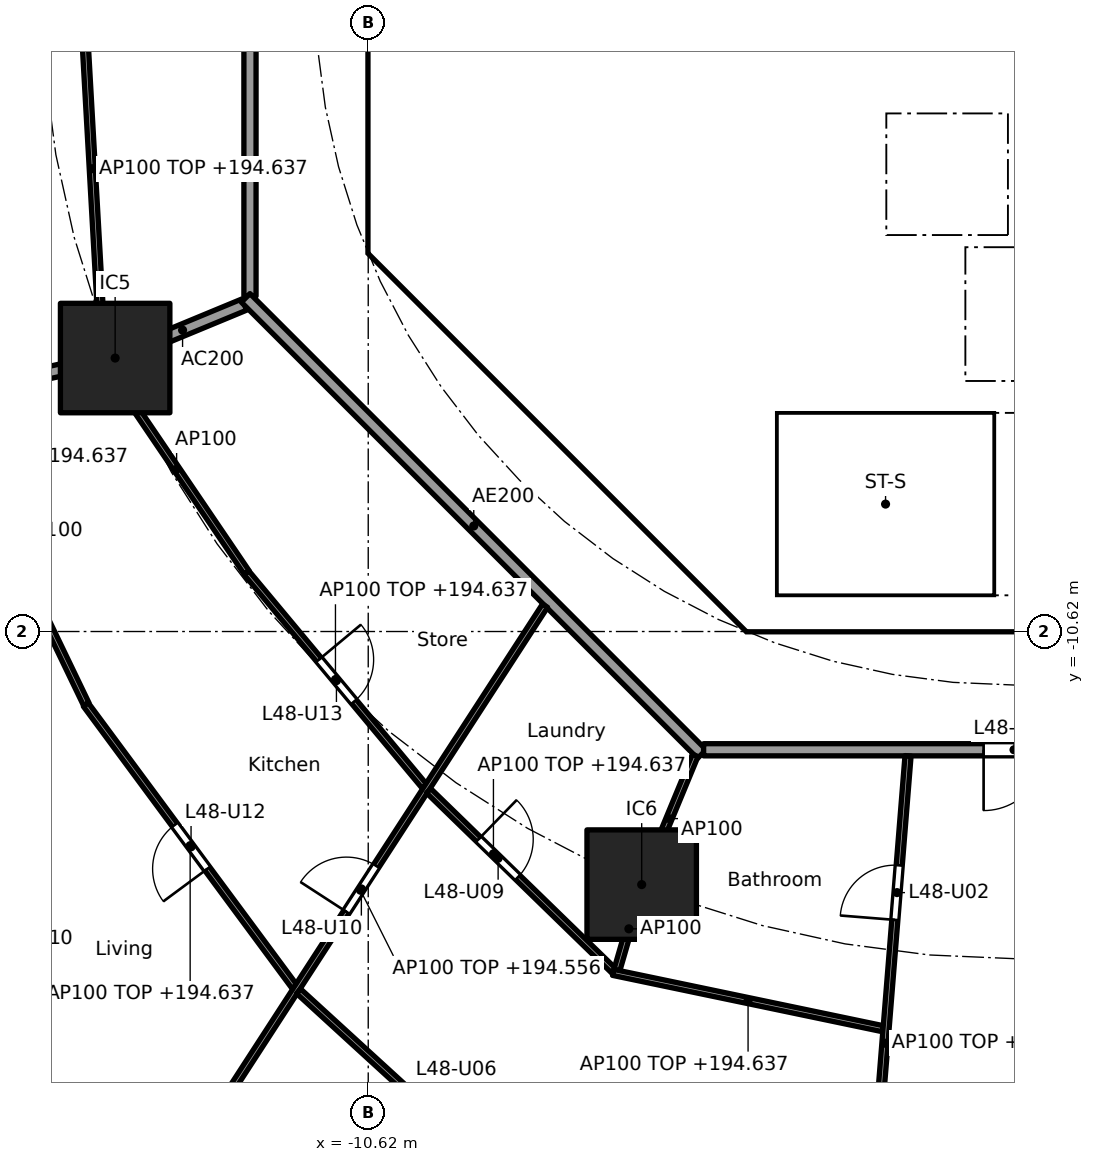
"""IFC4 building model, lengths in metres.
Left out: names, types, materials, properties, quantities, classifications, styles, units other than length and angle.
Written with IfcOpenShell. Run it as: python <this file> out.ifc"""

import sys

from ifc_helpers import new_model, si_unit, direction, frame, frame_2d, origin, origin_2d, place, context, subcontext, project, spatial, polyline, rectangle, outline, extrude, element, fill, save


model = new_model("IFC4")
c1 = context("Model", 3, precision=1e-05, world=origin(), true_north=direction((0.0, 1.0)))
c2 = subcontext(c1, "Body", "Model", "MODEL_VIEW")
j1 = project(units=[si_unit("LENGTHUNIT", "METRE"), si_unit("PLANEANGLEUNIT", "RADIAN")], contexts=[c1])
p1 = place(None, origin())
s1 = spatial("IfcSite", under=j1, at=p1, CompositionType="ELEMENT")
p2 = place(p1, origin())
s2 = spatial("IfcBuilding", under=s1, at=p2, CompositionType="ELEMENT")
p3 = place(p2, frame((0.0, 0.0, 191.8)))
s3 = spatial("IfcBuildingStorey", under=s2, at=p3, CompositionType="ELEMENT", Elevation=191.8)
for number, where, z_axis, x_axis in (
    (1, (-14.782, -6.123, 0.0), (0.0, 0.0, 1.0), (1.0, 0.0, 0.0)),
    (2, (-6.123, -14.782, 0.0), (0.0, 0.0, 1.0), (1.0, 0.0, 0.0)),
):
    element("IfcColumn", number, at=place(p3, frame(where, z_axis=z_axis, x_axis=x_axis)), inside=s3, PredefinedType="COLUMN", context=c2, shape_type="SweptSolid", body=[
        extrude(rectangle(XDim=1.8, YDim=1.8, at=origin_2d()), origin(), (0.0, 0.0, 1.0), 3.7),
    ])
p4 = place(p3, frame((-10.325, 3.801, 0.0), z_axis=(0.0, 0.0, 1.0), x_axis=(0.0, -1.0, 0.0)))
e3 = element("IfcWall", 3, at=p4, inside=s3, PredefinedType="SHEAR", context=c2, shape_type="SweptSolid", body=[
    extrude(rectangle(XDim=7.602, YDim=0.6, at=frame_2d((3.801, 0.0))), origin(), (0.0, 0.0, 1.0), 3.44),
])
p5 = place(p4, frame((0.651, 0.0, 0.0)))
e4 = element("IfcOpeningElement", 4, at=p5, cuts=e3, PredefinedType="OPENING", context=c2, shape_type="SweptSolid", body=[
    extrude(rectangle(XDim=1.5, YDim=2.1, at=frame_2d((0.75, 1.05))), frame((0.0, 0.31, 0.0), z_axis=(0.0, -1.0, 0.0), x_axis=(1.0, 0.0, 0.0)), (0.0, 0.0, 1.0), 0.62),
])
p6 = place(p4, frame((5.451, 0.0, 0.0)))
e5 = element("IfcOpeningElement", 5, at=p6, cuts=e3, PredefinedType="OPENING", context=c2, shape_type="SweptSolid", body=[
    extrude(rectangle(XDim=1.5, YDim=2.1, at=frame_2d((0.75, 1.05))), frame((0.0, 0.31, 0.0), z_axis=(0.0, -1.0, 0.0), x_axis=(1.0, 0.0, 0.0)), (0.0, 0.0, 1.0), 0.62),
])
p7 = place(p3, frame((-9.988, -4.613, 0.0), z_axis=(0.0, 0.0, 1.0), x_axis=(0.707106781187, -0.707106781187, 0.0)))
e6 = element("IfcWall", 6, at=p7, inside=s3, PredefinedType="SHEAR", context=c2, shape_type="SweptSolid", body=[
    extrude(rectangle(XDim=7.602, YDim=0.6, at=frame_2d((3.801, 0.0))), origin(), (0.0, 0.0, 1.0), 3.44),
])
p8 = place(p7, frame((6.151, 0.0, 0.0)))
e7 = element("IfcOpeningElement", 7, at=p8, cuts=e6, PredefinedType="OPENING", context=c2, shape_type="SweptSolid", body=[
    extrude(rectangle(XDim=1.1, YDim=2.1, at=frame_2d((0.55, 1.05))), frame((0.0, 0.31, 0.0), z_axis=(0.0, -1.0, 0.0), x_axis=(1.0, 0.0, 0.0)), (0.0, 0.0, 1.0), 0.62),
])
p9 = place(p3, frame((-7.4, -6.627, 0.0), z_axis=(0.0, 0.0, 1.0), x_axis=(0.0, 1.0, 0.0)))
e8 = element("IfcWall", 8, at=p9, inside=s3, PredefinedType="PARTITIONING", context=c2, shape_type="SweptSolid", body=[
    extrude(rectangle(XDim=2.527, YDim=0.15, at=frame_2d((1.263, 0.0))), origin(), (0.0, 0.0, 1.0), 3.44),
])
p10 = place(p9, frame((0.776, 0.0, 0.0)))
e9 = element("IfcOpeningElement", 9, at=p10, cuts=e8, PredefinedType="OPENING", context=c2, shape_type="SweptSolid", body=[
    extrude(rectangle(XDim=0.9, YDim=2.1, at=frame_2d((0.45, 1.05))), frame((0.0, 0.085, 0.0), z_axis=(0.0, -1.0, 0.0), x_axis=(1.0, 0.0, 0.0)), (0.0, 0.0, 1.0), 0.17),
])
p11 = place(p3, frame((-4.0, -6.5, 0.0), z_axis=(0.0, 0.0, 1.0), x_axis=(0.0, 1.0, 0.0)))
e10 = element("IfcWall", 10, at=p11, inside=s3, PredefinedType="SOLIDWALL", context=c2, shape_type="SweptSolid", body=[
    extrude(rectangle(XDim=2.2, YDim=0.2, at=frame_2d((1.1, 0.0))), origin(), (0.0, 0.0, 1.0), 3.44),
])
p12 = place(p11, frame((0.65, 0.0, 0.0)))
e11 = element("IfcOpeningElement", 11, at=p12, cuts=e10, PredefinedType="OPENING", context=c2, shape_type="SweptSolid", body=[
    extrude(rectangle(XDim=0.9, YDim=2.1, at=frame_2d((0.45, 1.05))), frame((0.0, 0.11, 0.0), z_axis=(0.0, -1.0, 0.0), x_axis=(1.0, 0.0, 0.0)), (0.0, 0.0, 1.0), 0.22),
])
p13 = place(p3, frame((-6.7, -2.0, 0.0), z_axis=(0.0, 0.0, 1.0), x_axis=(1.0, 0.0, 0.0)))
e12 = element("IfcWall", 12, at=p13, inside=s3, PredefinedType="SOLIDWALL", context=c2, shape_type="SweptSolid", body=[
    extrude(rectangle(XDim=13.4, YDim=0.2, at=frame_2d((6.7, 0.0))), origin(), (0.0, 0.0, 1.0), 3.44),
])
p14 = place(p13, frame((5.05, 0.0, 0.0)))
e13 = element("IfcOpeningElement", 13, at=p14, cuts=e12, PredefinedType="OPENING", context=c2, shape_type="SweptSolid", body=[
    extrude(rectangle(XDim=1.1, YDim=2.1, at=frame_2d((0.55, 1.05))), frame((0.0, 0.11, 0.0), z_axis=(0.0, -1.0, 0.0), x_axis=(1.0, 0.0, 0.0)), (0.0, 0.0, 1.0), 0.22),
])
p15 = place(p13, frame((7.25, 0.0, 0.0)))
e14 = element("IfcOpeningElement", 14, at=p15, cuts=e12, PredefinedType="OPENING", context=c2, shape_type="SweptSolid", body=[
    extrude(rectangle(XDim=1.1, YDim=2.1, at=frame_2d((0.55, 1.05))), frame((0.0, 0.11, 0.0), z_axis=(0.0, -1.0, 0.0), x_axis=(1.0, 0.0, 0.0)), (0.0, 0.0, 1.0), 0.22),
])
p16 = place(p13, frame((1.85, 0.0, 0.0)))
e15 = element("IfcOpeningElement", 15, at=p16, cuts=e12, PredefinedType="OPENING", context=c2, shape_type="SweptSolid", body=[
    extrude(rectangle(XDim=0.9, YDim=2.1, at=frame_2d((0.45, 1.05))), frame((0.0, 0.11, 0.0), z_axis=(0.0, -1.0, 0.0), x_axis=(1.0, 0.0, 0.0)), (0.0, 0.0, 1.0), 0.22),
])
p17 = place(p3, origin())
e16 = element("IfcWall", 16, at=p17, inside=s3, PredefinedType="SHEAR", context=c2, shape_type="SweptSolid", body=[
    extrude(outline(polyline([(-10.625, -3.801), (-10.025, -3.801), (-10.025, -4.152), (-9.776, -4.401), (-10.2, -4.825), (-10.625, -4.401), (-10.625, -3.801)])), origin(), (0.0, 0.0, 1.0), 3.44),
])
p18 = place(p3, origin())
e17 = element("IfcWall", 17, at=p18, inside=s3, PredefinedType="SHEAR", context=c2, shape_type="SweptSolid", body=[
    extrude(outline(polyline([(-4.152, -10.025), (4.152, -10.025), (4.401, -9.776), (4.825, -10.2), (4.401, -10.625), (-4.401, -10.625), (-4.825, -10.2), (-4.401, -9.776), (-4.152, -10.025)])), origin(), (0.0, 0.0, 1.0), 3.44),
])
p19 = place(p3, frame((-10.025, -4.0, 0.0), z_axis=(0.0, 0.0, 1.0), x_axis=(1.0, 0.0, 0.0)))
e18 = element("IfcWall", 18, at=p19, inside=s3, PredefinedType="PARTITIONING", context=c2, shape_type="SweptSolid", body=[
    extrude(rectangle(XDim=3.325, YDim=0.2, at=frame_2d((1.662, 0.0))), origin(), (0.0, 0.0, 1.0), 3.44),
])
p20 = place(p3, frame((-0.9, -6.5, 0.0), z_axis=(0.0, 0.0, 1.0), x_axis=(0.0, 1.0, 0.0)))
e19 = element("IfcWall", 19, at=p20, inside=s3, PredefinedType="SOLIDWALL", context=c2, shape_type="SweptSolid", body=[
    extrude(rectangle(XDim=2.2, YDim=0.2, at=frame_2d((1.1, 0.0))), origin(), (0.0, 0.0, 1.0), 3.44),
])
p21 = place(p3, origin())
e20 = element("IfcWall", 20, at=p21, inside=s3, PredefinedType="SOLIDWALL", context=c2, shape_type="SweptSolid", body=[
    extrude(outline(polyline([(-6.7, -2.1), (-6.5, -2.1), (-6.5, -4.1), (-2.3, -4.1), (-2.3, -2.1), (-2.1, -2.1), (-2.1, -4.1), (-0.1, -4.1), (-0.1, -2.1), (0.1, -2.1), (0.1, -4.1), (2.1, -4.1), (2.1, -2.1), (2.3, -2.1), (2.3, -4.1), (4.3, -4.1), (4.3, -2.1), (4.5, -2.1), (4.5, -4.1), (6.5, -4.1), (6.5, -2.1), (6.7, -2.1), (6.7, -4.3), (-6.7, -4.3), (-6.7, -2.1)])), origin(), (0.0, 0.0, 1.0), 3.44),
])
p22 = place(p3, origin())
e21 = element("IfcWall", 21, at=p22, inside=s3, PredefinedType="SOLIDWALL", context=c2, shape_type="SweptSolid", body=[
    extrude(outline(polyline([(-3.9, -10.025), (-4.1, -10.025), (-4.1, -7.025), (-3.9, -7.025), (-3.9, -10.025)])), origin(), (0.0, 0.0, 1.0), 3.44),
])
p23 = place(p3, origin())
e22 = element("IfcWall", 22, at=p23, inside=s3, PredefinedType="SOLIDWALL", context=c2, shape_type="SweptSolid", body=[
    extrude(outline(polyline([(4.1, -7.025), (-4.1, -7.025), (-4.1, -6.5), (4.1, -6.5), (4.1, -7.025)])), origin(), (0.0, 0.0, 1.0), 3.44),
])
p24 = place(p3, frame((-12.657, -5.243, 0.0), z_axis=(0.0, 0.0, 1.0), x_axis=(-0.923859888513, -0.38273085373, 0.0)))
e23 = element("IfcWall", 23, at=p24, inside=s3, PredefinedType="PARTITIONING", context=c2, shape_type="SweptSolid", body=[
    extrude(rectangle(XDim=2.199, YDim=0.2, at=frame_2d((1.1, 0.0))), origin(), (0.0, 0.0, 1.0), 3.44),
])
p25 = place(p3, frame((-14.831, -6.134, 0.0), z_axis=(0.0, 0.0, 1.0), x_axis=(-0.976568396888, -0.215207263354, 0.0)))
e24 = element("IfcWall", 24, at=p25, inside=s3, PredefinedType="PARTITIONING", context=c2, shape_type="SweptSolid", body=[
    extrude(rectangle(XDim=5.177, YDim=0.2, at=frame_2d((2.588, 0.0))), origin(), (0.0, 0.0, 1.0), 2.837),
])
p26 = place(p3, frame((-12.565, 5.304, 0.0), z_axis=(0.0, 0.0, 1.0), x_axis=(0.0, -1.0, 0.0)))
e25 = element("IfcWall", 25, at=p26, inside=s3, PredefinedType="PARTITIONING", context=c2, shape_type="SweptSolid", body=[
    extrude(rectangle(XDim=10.409, YDim=0.2, at=frame_2d((5.205, 0.0))), origin(), (0.0, 0.0, 1.0), 3.44),
])
p27 = place(p3, frame((-12.635, -5.134, 0.0), z_axis=(0.0, 0.0, 1.0), x_axis=(0.707106781187, -0.707106781187, 0.0)))
e26 = element("IfcWall", 26, at=p27, inside=s3, PredefinedType="PARTITIONING", context=c2, shape_type="SweptSolid", body=[
    extrude(rectangle(XDim=10.609, YDim=0.2, at=frame_2d((5.305, 0.0))), origin(), (0.0, 0.0, 1.0), 3.44),
])
p28 = place(p3, frame((-5.104, -12.565, 0.0), z_axis=(0.0, 0.0, 1.0), x_axis=(1.0, 0.0, 0.0)))
e27 = element("IfcWall", 27, at=p28, inside=s3, PredefinedType="PARTITIONING", context=c2, shape_type="SweptSolid", body=[
    extrude(rectangle(XDim=10.409, YDim=0.2, at=frame_2d((5.205, 0.0))), origin(), (0.0, 0.0, 1.0), 3.44),
])
p29 = place(p28, frame((4.604, 0.0, 0.0)))
e28 = element("IfcOpeningElement", 28, at=p29, cuts=e27, PredefinedType="OPENING", context=c2, shape_type="SweptSolid", body=[
    extrude(rectangle(XDim=1.0, YDim=2.1, at=frame_2d((0.5, 1.05))), frame((0.0, 0.11, 0.0), z_axis=(0.0, -1.0, 0.0), x_axis=(1.0, 0.0, 0.0)), (0.0, 0.0, 1.0), 0.22),
])
p30 = place(p3, frame((-15.331, 0.05, 0.0), z_axis=(0.0, 0.0, 1.0), x_axis=(0.056310939406, -0.998413280212, 0.0)))
e29 = element("IfcWall", 29, at=p30, inside=s3, PredefinedType="PARTITIONING", context=c2, shape_type="SweptSolid", body=[
    extrude(rectangle(XDim=6.126, YDim=0.1, at=frame_2d((3.063, 0.0))), origin(), (0.0, 0.0, 1.0), 2.837),
])
p31 = place(p3, frame((-14.924, -6.249, 0.0), z_axis=(0.0, 0.0, 1.0), x_axis=(0.561046521684, -0.82778427172, 0.0)))
e30 = element("IfcWall", 30, at=p31, inside=s3, PredefinedType="PARTITIONING", context=c2, shape_type="SweptSolid", body=[
    extrude(rectangle(XDim=4.109, YDim=0.1, at=frame_2d((2.054, 0.0))), origin(), (0.0, 0.0, 1.0), 3.44),
])
p32 = place(p3, frame((-17.647, -6.854, 0.0), z_axis=(0.0, 0.0, 1.0), x_axis=(0.434027506504, -0.900899619046, 0.0)))
e31 = element("IfcWall", 31, at=p32, inside=s3, PredefinedType="PARTITIONING", context=c2, shape_type="SweptSolid", body=[
    extrude(rectangle(XDim=5.508, YDim=0.1, at=frame_2d((2.754, 0.0))), origin(), (0.0, 0.0, 1.0), 3.44),
])
p33 = place(p3, frame((-12.623, -9.653, 0.0), z_axis=(0.0, 0.0, 1.0), x_axis=(0.640315711982, -0.768111833647, 0.0)))
e32 = element("IfcWall", 32, at=p33, inside=s3, PredefinedType="PARTITIONING", context=c2, shape_type="SweptSolid", body=[
    extrude(rectangle(XDim=4.572, YDim=0.1, at=frame_2d((2.286, 0.0))), origin(), (0.0, 0.0, 1.0), 2.837),
])
p34 = place(p33, frame((1.861, 0.0, 0.0)))
e33 = element("IfcOpeningElement", 33, at=p34, cuts=e32, PredefinedType="OPENING", context=c2, shape_type="SweptSolid", body=[
    extrude(rectangle(XDim=0.9, YDim=2.1, at=frame_2d((0.45, 1.05))), frame((0.0, 0.06, 0.0), z_axis=(0.0, -1.0, 0.0), x_axis=(1.0, 0.0, 0.0)), (0.0, 0.0, 1.0), 0.12),
])
p35 = place(p3, frame((-15.265, -11.821, 0.0), z_axis=(0.0, 0.0, 1.0), x_axis=(0.594721645029, -0.803931691709, 0.0)))
e34 = element("IfcWall", 34, at=p35, inside=s3, PredefinedType="PARTITIONING", context=c2, shape_type="SweptSolid", body=[
    extrude(rectangle(XDim=5.772, YDim=0.1, at=frame_2d((2.886, 0.0))), origin(), (0.0, 0.0, 1.0), 2.837),
])
p36 = place(p35, frame((2.461, 0.0, 0.0)))
e35 = element("IfcOpeningElement", 35, at=p36, cuts=e34, PredefinedType="OPENING", context=c2, shape_type="SweptSolid", body=[
    extrude(rectangle(XDim=0.9, YDim=2.1, at=frame_2d((0.45, 1.05))), frame((0.0, 0.06, 0.0), z_axis=(0.0, -1.0, 0.0), x_axis=(1.0, 0.0, 0.0)), (0.0, 0.0, 1.0), 0.12),
])
p37 = place(p3, frame((-7.712, -10.195, 0.0), z_axis=(0.0, 0.0, 1.0), x_axis=(-0.544176533609, -0.838970738625, 0.0)))
e36 = element("IfcWall", 36, at=p37, inside=s3, PredefinedType="PARTITIONING", context=c2, shape_type="SweptSolid", body=[
    extrude(rectangle(XDim=11.156, YDim=0.1, at=frame_2d((5.578, 0.0))), origin(), (0.0, 0.0, 1.0), 2.756),
])
p38 = place(p37, frame((5.101, 0.0, 0.0)))
e37 = element("IfcOpeningElement", 37, at=p38, cuts=e36, PredefinedType="OPENING", context=c2, shape_type="SweptSolid", body=[
    extrude(rectangle(XDim=0.9, YDim=2.1, at=frame_2d((0.45, 1.05))), frame((0.0, 0.06, 0.0), z_axis=(0.0, -1.0, 0.0), x_axis=(1.0, 0.0, 0.0)), (0.0, 0.0, 1.0), 0.12),
])
p39 = place(p3, frame((-9.627, -13.238, 0.0), z_axis=(0.0, 0.0, 1.0), x_axis=(0.716946269374, -0.697128429223, 0.0)))
e38 = element("IfcWall", 38, at=p39, inside=s3, PredefinedType="PARTITIONING", context=c2, shape_type="SweptSolid", body=[
    extrude(rectangle(XDim=4.25, YDim=0.1, at=frame_2d((2.125, 0.0))), origin(), (0.0, 0.0, 1.0), 2.837),
])
p40 = place(p39, frame((1.145, 0.0, 0.0)))
e39 = element("IfcOpeningElement", 39, at=p40, cuts=e38, PredefinedType="OPENING", context=c2, shape_type="SweptSolid", body=[
    extrude(rectangle(XDim=0.9, YDim=2.1, at=frame_2d((0.45, 1.05))), frame((0.0, 0.06, 0.0), z_axis=(0.0, -1.0, 0.0), x_axis=(1.0, 0.0, 0.0)), (0.0, 0.0, 1.0), 0.12),
])
p41 = place(p3, frame((-11.766, -16.535, 0.0), z_axis=(0.0, 0.0, 1.0), x_axis=(0.738053852169, -0.674741810842, 0.0)))
e40 = element("IfcWall", 40, at=p41, inside=s3, PredefinedType="PARTITIONING", context=c2, shape_type="SweptSolid", body=[
    extrude(rectangle(XDim=5.549, YDim=0.1, at=frame_2d((2.774, 0.0))), origin(), (0.0, 0.0, 1.0), 2.837),
])
p42 = place(p41, frame((2.3, 0.0, 0.0)))
e41 = element("IfcOpeningElement", 41, at=p42, cuts=e40, PredefinedType="OPENING", context=c2, shape_type="SweptSolid", body=[
    extrude(rectangle(XDim=0.9, YDim=2.1, at=frame_2d((0.45, 1.05))), frame((0.0, 0.06, 0.0), z_axis=(0.0, -1.0, 0.0), x_axis=(1.0, 0.0, 0.0)), (0.0, 0.0, 1.0), 0.12),
])
p43 = place(p3, frame((-5.243, -12.657, 0.0), z_axis=(0.0, 0.0, 1.0), x_axis=(-0.382719158442, -0.923864733477, 0.0)))
e42 = element("IfcWall", 42, at=p43, inside=s3, PredefinedType="PARTITIONING", context=c2, shape_type="SweptSolid", body=[
    extrude(rectangle(XDim=2.25, YDim=0.1, at=frame_2d((1.125, 0.0))), origin(), (0.0, 0.0, 1.0), 3.44),
])
p44 = place(p3, frame((-6.137, -14.831, 0.0), z_axis=(0.0, 0.0, 1.0), x_axis=(-0.2785069197, -0.960434222464, 0.0)))
e43 = element("IfcWall", 43, at=p44, inside=s3, PredefinedType="PARTITIONING", context=c2, shape_type="SweptSolid", body=[
    extrude(rectangle(XDim=1.413, YDim=0.1, at=frame_2d((0.707, 0.0))), origin(), (0.0, 0.0, 1.0), 3.44),
])
p45 = place(p3, frame((-6.594, -16.226, 0.0), z_axis=(0.0, 0.0, 1.0), x_axis=(0.978902428641, -0.204328253553, 0.0)))
e44 = element("IfcWall", 44, at=p45, inside=s3, PredefinedType="PARTITIONING", context=c2, shape_type="SweptSolid", body=[
    extrude(rectangle(XDim=4.536, YDim=0.1, at=frame_2d((2.268, 0.0))), origin(), (0.0, 0.0, 1.0), 2.837),
])
p46 = place(p3, frame((-1.743, -12.665, 0.0), z_axis=(0.0, 0.0, 1.0), x_axis=(-0.080170892619, -0.996781133437, 0.0)))
e45 = element("IfcWall", 45, at=p46, inside=s3, PredefinedType="PARTITIONING", context=c2, shape_type="SweptSolid", body=[
    extrude(rectangle(XDim=9.483, YDim=0.1, at=frame_2d((4.741, 0.0))), origin(), (0.0, 0.0, 1.0), 2.756),
])
p47 = place(p46, frame((1.806, 0.0, 0.0)))
e46 = element("IfcOpeningElement", 46, at=p47, cuts=e45, PredefinedType="OPENING", context=c2, shape_type="SweptSolid", body=[
    extrude(rectangle(XDim=0.9, YDim=2.1, at=frame_2d((0.45, 1.05))), frame((0.0, 0.06, 0.0), z_axis=(0.0, -1.0, 0.0), x_axis=(1.0, 0.0, 0.0)), (0.0, 0.0, 1.0), 0.12),
])
p48 = place(p46, frame((6.523, 0.0, 0.0)))
e47 = element("IfcOpeningElement", 47, at=p48, cuts=e45, PredefinedType="OPENING", context=c2, shape_type="SweptSolid", body=[
    extrude(rectangle(XDim=0.9, YDim=2.1, at=frame_2d((0.45, 1.05))), frame((0.0, 0.06, 0.0), z_axis=(0.0, -1.0, 0.0), x_axis=(1.0, 0.0, 0.0)), (0.0, 0.0, 1.0), 0.12),
])
p49 = place(p14, origin())
e48 = element("IfcDoor", 48, at=p49, inside=s3, OperationType="DOUBLE_DOOR_SLIDING", PredefinedType="DOOR", context=c2, shape_type="SweptSolid", body=[
    extrude(rectangle(XDim=1.1, YDim=2.1, at=frame_2d((0.55, 1.05))), frame((0.0, 0.025, 0.0), z_axis=(0.0, -1.0, 0.0), x_axis=(1.0, 0.0, 0.0)), (0.0, 0.0, 1.0), 0.05),
])
fill(e13, e48)
p50 = place(p10, origin())
e49 = element("IfcDoor", 49, at=p50, inside=s3, OperationType="SINGLE_SWING_RIGHT", PredefinedType="DOOR", context=c2, shape_type="SweptSolid", body=[
    extrude(rectangle(XDim=0.9, YDim=2.1, at=frame_2d((0.45, 1.05))), frame((0.0, 0.025, 0.0), z_axis=(0.0, -1.0, 0.0), x_axis=(1.0, 0.0, 0.0)), (0.0, 0.0, 1.0), 0.05),
])
fill(e9, e49)
p51 = place(p12, frame((0.9, 0.0, 0.0), x_axis=(-1.0, 0.0, 0.0)))
e50 = element("IfcDoor", 50, at=p51, inside=s3, OperationType="SINGLE_SWING_LEFT", PredefinedType="DOOR", context=c2, shape_type="SweptSolid", body=[
    extrude(rectangle(XDim=0.9, YDim=2.1, at=frame_2d((0.45, 1.05))), frame((0.0, 0.025, 0.0), z_axis=(0.0, -1.0, 0.0), x_axis=(1.0, 0.0, 0.0)), (0.0, 0.0, 1.0), 0.05),
])
fill(e11, e50)
p52 = place(p16, frame((0.9, 0.0, 0.0), x_axis=(-1.0, 0.0, 0.0)))
e51 = element("IfcDoor", 51, at=p52, inside=s3, OperationType="SINGLE_SWING_RIGHT", PredefinedType="DOOR", context=c2, shape_type="SweptSolid", body=[
    extrude(rectangle(XDim=0.9, YDim=2.1, at=frame_2d((0.45, 1.05))), frame((0.0, 0.025, 0.0), z_axis=(0.0, -1.0, 0.0), x_axis=(1.0, 0.0, 0.0)), (0.0, 0.0, 1.0), 0.05),
])
fill(e15, e51)
p53 = place(p6, origin())
e52 = element("IfcDoor", 52, at=p53, inside=s3, OperationType="DOUBLE_DOOR_SINGLE_SWING", PredefinedType="DOOR", context=c2, shape_type="SweptSolid", body=[
    extrude(rectangle(XDim=1.5, YDim=2.1, at=frame_2d((0.75, 1.05))), frame((0.0, 0.025, 0.0), z_axis=(0.0, -1.0, 0.0), x_axis=(1.0, 0.0, 0.0)), (0.0, 0.0, 1.0), 0.05),
])
fill(e5, e52)
p54 = place(p8, origin())
e53 = element("IfcDoor", 53, at=p54, inside=s3, OperationType="SINGLE_SWING_RIGHT", PredefinedType="DOOR", context=c2, shape_type="SweptSolid", body=[
    extrude(rectangle(XDim=1.1, YDim=2.1, at=frame_2d((0.55, 1.05))), frame((0.0, 0.025, 0.0), z_axis=(0.0, -1.0, 0.0), x_axis=(1.0, 0.0, 0.0)), (0.0, 0.0, 1.0), 0.05),
])
fill(e7, e53)
p55 = place(p29, frame((1.0, 0.0, 0.0), x_axis=(-1.0, 0.0, 0.0)))
e54 = element("IfcDoor", 54, at=p55, inside=s3, OperationType="SINGLE_SWING_RIGHT", PredefinedType="DOOR", context=c2, shape_type="SweptSolid", body=[
    extrude(rectangle(XDim=1.0, YDim=2.1, at=frame_2d((0.5, 1.05))), frame((0.0, 0.025, 0.0), z_axis=(0.0, -1.0, 0.0), x_axis=(1.0, 0.0, 0.0)), (0.0, 0.0, 1.0), 0.05),
])
fill(e28, e54)
p56 = place(p47, frame((0.9, 0.0, 0.0), x_axis=(-1.0, 0.0, 0.0)))
e55 = element("IfcDoor", 55, at=p56, inside=s3, OperationType="SINGLE_SWING_LEFT", PredefinedType="DOOR", context=c2, shape_type="SweptSolid", body=[
    extrude(rectangle(XDim=0.9, YDim=2.1, at=frame_2d((0.45, 1.05))), frame((0.0, 0.025, 0.0), z_axis=(0.0, -1.0, 0.0), x_axis=(1.0, 0.0, 0.0)), (0.0, 0.0, 1.0), 0.05),
])
fill(e46, e55)
p57 = place(p40, origin())
e56 = element("IfcDoor", 56, at=p57, inside=s3, OperationType="SINGLE_SWING_LEFT", PredefinedType="DOOR", context=c2, shape_type="SweptSolid", body=[
    extrude(rectangle(XDim=0.9, YDim=2.1, at=frame_2d((0.45, 1.05))), frame((0.0, 0.025, 0.0), z_axis=(0.0, -1.0, 0.0), x_axis=(1.0, 0.0, 0.0)), (0.0, 0.0, 1.0), 0.05),
])
fill(e39, e56)
p58 = place(p38, frame((0.9, 0.0, 0.0), x_axis=(-1.0, 0.0, 0.0)))
e57 = element("IfcDoor", 57, at=p58, inside=s3, OperationType="SINGLE_SWING_LEFT", PredefinedType="DOOR", context=c2, shape_type="SweptSolid", body=[
    extrude(rectangle(XDim=0.9, YDim=2.1, at=frame_2d((0.45, 1.05))), frame((0.0, 0.025, 0.0), z_axis=(0.0, -1.0, 0.0), x_axis=(1.0, 0.0, 0.0)), (0.0, 0.0, 1.0), 0.05),
])
fill(e37, e57)
p59 = place(p36, frame((0.9, 0.0, 0.0), x_axis=(-1.0, 0.0, 0.0)))
e58 = element("IfcDoor", 58, at=p59, inside=s3, OperationType="SINGLE_SWING_LEFT", PredefinedType="DOOR", context=c2, shape_type="SweptSolid", body=[
    extrude(rectangle(XDim=0.9, YDim=2.1, at=frame_2d((0.45, 1.05))), frame((0.0, 0.025, 0.0), z_axis=(0.0, -1.0, 0.0), x_axis=(1.0, 0.0, 0.0)), (0.0, 0.0, 1.0), 0.05),
])
fill(e35, e58)
p60 = place(p34, origin())
e59 = element("IfcDoor", 59, at=p60, inside=s3, OperationType="SINGLE_SWING_LEFT", PredefinedType="DOOR", context=c2, shape_type="SweptSolid", body=[
    extrude(rectangle(XDim=0.9, YDim=2.1, at=frame_2d((0.45, 1.05))), frame((0.0, 0.025, 0.0), z_axis=(0.0, -1.0, 0.0), x_axis=(1.0, 0.0, 0.0)), (0.0, 0.0, 1.0), 0.05),
])
fill(e33, e59)
save(model, sys.argv[1])
